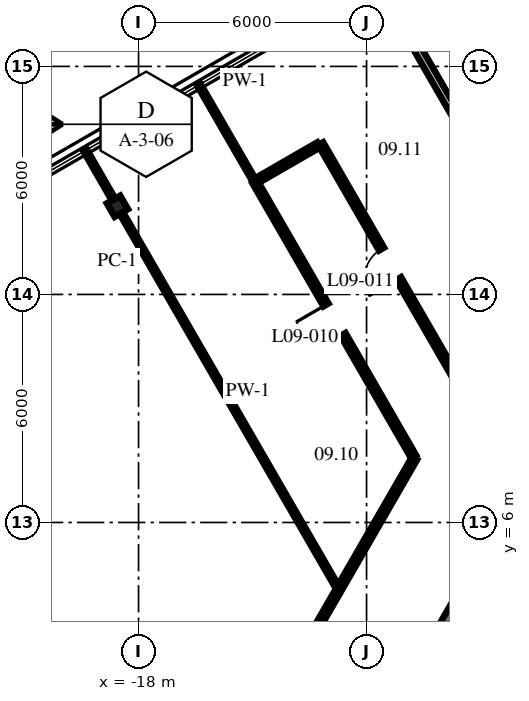
"""IFC4 building model, lengths in metres.
Left out: names, types, materials, properties, quantities, classifications, styles, units other than length and angle.
Written with IfcOpenShell. Run it as: python <this file> out.ifc"""

import sys

from ifc_helpers import new_model, si_unit, direction, frame, frame_2d, origin, origin_2d, place, context, subcontext, project, spatial, polyline, rectangle, i_section, outline, extrude, source, transform, mapped, element, fill, save


model = new_model("IFC4")
c1 = context("Model", 3, precision=1e-05, world=origin(), true_north=direction((0.0, 1.0)))
c2 = subcontext(c1, "Body", "Model", "MODEL_VIEW")
j1 = project(units=[si_unit("LENGTHUNIT", "METRE"), si_unit("PLANEANGLEUNIT", "RADIAN")], contexts=[c1])
p1 = place(None, origin())
s1 = spatial("IfcSite", under=j1, at=p1, CompositionType="ELEMENT")
p2 = place(p1, origin())
s2 = spatial("IfcBuilding", under=s1, at=p2, CompositionType="ELEMENT")
p3 = place(p2, frame((0.0, 0.0, 41.8)))
s3 = spatial("IfcBuildingStorey", under=s2, at=p3, CompositionType="ELEMENT", Elevation=41.8)
m1 = source(origin(), c2, "Body", "SweptSolid", [
    extrude(i_section(OverallWidth=0.404, OverallDepth=0.406, WebThickness=0.027, FlangeThickness=0.044, at=origin_2d()), origin(), (0.0, 0.0, 1.0), 4.3),
])
p4 = place(p3, frame((-18.556, 14.32, 0.0), z_axis=(0.0, 0.0, 1.0), x_axis=(-0.866025403784, -0.5, 0.0)))
e1 = element("IfcColumn", 1, at=p4, inside=s3, PredefinedType="COLUMN", context=c2, shape_type="MappedRepresentation", body=[
    mapped(m1, transform((0.0, 0.0, 0.0), scale=1.0)),
])
m2 = source(origin(), c2, "Body", "SweptSolid", [
    extrude(outline(polyline([(-0.115, -0.2), (11.885, -0.2), (11.654, 0.2), (0.115, 0.2), (-0.115, -0.2)])), origin(), (0.0, 0.0, 1.0), 4.1),
])
p5 = place(p3, frame((-5.885, 10.192, 0.0), z_axis=(0.0, 0.0, 1.0), x_axis=(-0.499996592174, -0.866027371285, 0.0)))
e2 = element("IfcWall", 2, at=p5, inside=s3, PredefinedType="SHEAR", context=c2, shape_type="MappedRepresentation", body=[
    mapped(m2, transform((0.0, 0.0, 0.0), scale=1.0)),
])
p6 = place(p5, frame((3.185, 0.0, 0.0)))
e3 = element("IfcOpeningElement", 3, at=p6, cuts=e2, PredefinedType="OPENING", context=c2, shape_type="SweptSolid", body=[
    extrude(rectangle(XDim=1.2, YDim=2.1, at=frame_2d((0.6, 1.05))), frame((0.0, 0.21, 0.0), z_axis=(0.0, -1.0, 0.0), x_axis=(1.0, 0.0, 0.0)), (0.0, 0.0, 1.0), 0.42),
])
m3 = source(origin(), c2, "Body", "SweptSolid", [
    extrude(rectangle(XDim=1.499, YDim=0.1, at=frame_2d((0.749, 0.0))), origin(), (0.0, 0.0, 1.0), 4.1),
])
p7 = place(p3, frame((-19.402, 15.785, 0.0), z_axis=(0.0, 0.0, 1.0), x_axis=(0.499976292358, -0.866039090965, 0.0)))
e4 = element("IfcWall", 4, at=p7, inside=s3, PredefinedType="PARTITIONING", context=c2, shape_type="MappedRepresentation", body=[
    mapped(m3, transform((0.0, 0.0, 0.0), scale=1.0)),
])
m4 = source(origin(), c2, "Body", "SweptSolid", [
    extrude(rectangle(XDim=11.455, YDim=0.1, at=frame_2d((5.728, 0.0))), origin(), (0.0, 0.0, 1.0), 3.343),
])
p8 = place(p3, frame((-18.459, 14.153, 0.0), z_axis=(0.0, 0.0, 1.0), x_axis=(0.500008416231, -0.866020544617, 0.0)))
e5 = element("IfcWall", 5, at=p8, inside=s3, PredefinedType="PARTITIONING", context=c2, shape_type="MappedRepresentation", body=[
    mapped(m4, transform((0.0, 0.0, 0.0), scale=1.0)),
])
p9 = place(p3, frame((-16.41, 17.513, 0.0), z_axis=(0.0, 0.0, 1.0), x_axis=(0.500041054325, -0.866001699761, 0.0)))
e6 = element("IfcWall", 6, at=p9, inside=s3, PredefinedType="PARTITIONING", context=c2, shape_type="SweptSolid", body=[
    extrude(rectangle(XDim=2.941, YDim=0.1, at=frame_2d((1.47, 0.0))), origin(), (0.0, 0.0, 1.0), 4.1),
])
p10 = place(p3, frame((-14.939, 14.965, 0.0), z_axis=(0.0, 0.0, 1.0), x_axis=(0.499977133552, -0.866038605332, 0.0)))
e7 = element("IfcWall", 7, at=p10, inside=s3, PredefinedType="PARTITIONING", context=c2, shape_type="SweptSolid", body=[
    extrude(rectangle(XDim=8.354, YDim=0.15, at=frame_2d((4.177, 0.0))), origin(), (0.0, 0.0, 1.0), 4.1),
])
p11 = place(p10, frame((3.74, 0.0, 0.0)))
e8 = element("IfcOpeningElement", 8, at=p11, cuts=e7, PredefinedType="OPENING", context=c2, shape_type="SweptSolid", body=[
    extrude(rectangle(XDim=0.9, YDim=2.1, at=frame_2d((0.45, 1.05))), frame((0.0, 0.085, 0.0), z_axis=(0.0, -1.0, 0.0), x_axis=(1.0, 0.0, 0.0)), (0.0, 0.0, 1.0), 0.17),
])
m5 = source(origin(), c2, "Body", "SweptSolid", [
    extrude(rectangle(XDim=7.249, YDim=0.15, at=frame_2d((3.625, 0.0))), origin(), (0.0, 0.0, 1.0), 4.1),
])
p12 = place(p3, frame((-13.207, 15.965, 0.0), z_axis=(0.0, 0.0, 1.0), x_axis=(0.500014967241, -0.866016762271, 0.0)))
e9 = element("IfcWall", 9, at=p12, inside=s3, PredefinedType="PARTITIONING", context=c2, shape_type="MappedRepresentation", body=[
    mapped(m5, transform((0.0, 0.0, 0.0), scale=1.0)),
])
p13 = place(p12, frame((3.199, 0.0, 0.0)))
e10 = element("IfcOpeningElement", 10, at=p13, cuts=e9, PredefinedType="OPENING", context=c2, shape_type="SweptSolid", body=[
    extrude(rectangle(XDim=0.9, YDim=2.1, at=frame_2d((0.45, 1.05))), frame((0.0, 0.085, 0.0), z_axis=(0.0, -1.0, 0.0), x_axis=(1.0, 0.0, 0.0)), (0.0, 0.0, 1.0), 0.17),
])
m6 = source(origin(), c2, "Body", "SweptSolid", [
    extrude(rectangle(XDim=6.241, YDim=0.2, at=frame_2d((3.121, 0.0))), origin(), (0.0, 0.0, 1.0), 3.488),
])
p14 = place(p3, frame((-10.743, 18.608, 0.0), z_axis=(0.0, 0.0, 1.0), x_axis=(0.499988843237, -0.866031845049, 0.0)))
e11 = element("IfcWall", 11, at=p14, inside=s3, PredefinedType="PARTITIONING", context=c2, shape_type="MappedRepresentation", body=[
    mapped(m6, transform((0.0, 0.0, 0.0), scale=1.0)),
])
m7 = source(origin(), c2, "Body", "SweptSolid", [
    extrude(rectangle(XDim=1.89, YDim=0.15, at=frame_2d((0.945, 0.0))), origin(), (0.0, 0.0, 1.0), 4.1),
])
p15 = place(p3, frame((-14.896, 14.991, 0.0), z_axis=(0.0, 0.0, 1.0), x_axis=(0.866000578957, 0.500042995397, 0.0)))
e12 = element("IfcWall", 12, at=p15, inside=s3, PredefinedType="PARTITIONING", context=c2, shape_type="MappedRepresentation", body=[
    mapped(m7, transform((0.0, 0.0, 0.0), scale=1.0)),
])
p16 = place(p3, frame((-15.175, 0.0, 0.0), z_axis=(0.0, 0.0, 1.0), x_axis=(0.499999423938, 0.866025736374, 0.0)))
e13 = element("IfcWall", 13, at=p16, inside=s3, PredefinedType="PARTITIONING", context=c2, shape_type="SweptSolid", body=[
    extrude(rectangle(XDim=8.876, YDim=0.15, at=frame_2d((4.438, 0.0))), origin(), (0.0, 0.0, 1.0), 4.1),
])
p17 = place(p16, frame((2.037, 0.0, 0.0)))
e14 = element("IfcOpeningElement", 14, at=p17, cuts=e13, PredefinedType="OPENING", context=c2, shape_type="SweptSolid", body=[
    extrude(rectangle(XDim=0.9, YDim=2.1, at=frame_2d((0.45, 1.05))), frame((0.0, 0.085, 0.0), z_axis=(0.0, -1.0, 0.0), x_axis=(1.0, 0.0, 0.0)), (0.0, 0.0, 1.0), 0.17),
])
p18 = place(p11, origin())
e15 = element("IfcDoor", 15, at=p18, inside=s3, OperationType="SINGLE_SWING_RIGHT", PredefinedType="DOOR", context=c2, shape_type="SweptSolid", body=[
    extrude(rectangle(XDim=0.9, YDim=2.1, at=frame_2d((0.45, 1.05))), frame((0.0, 0.025, 0.0), z_axis=(0.0, -1.0, 0.0), x_axis=(1.0, 0.0, 0.0)), (0.0, 0.0, 1.0), 0.05),
])
fill(e8, e15)
p19 = place(p13, origin())
e16 = element("IfcDoor", 16, at=p19, inside=s3, OperationType="SINGLE_SWING_RIGHT", PredefinedType="DOOR", context=c2, shape_type="SweptSolid", body=[
    extrude(rectangle(XDim=0.9, YDim=2.1, at=frame_2d((0.45, 1.05))), frame((0.0, 0.025, 0.0), z_axis=(0.0, -1.0, 0.0), x_axis=(1.0, 0.0, 0.0)), (0.0, 0.0, 1.0), 0.05),
])
fill(e10, e16)
save(model, sys.argv[1])
